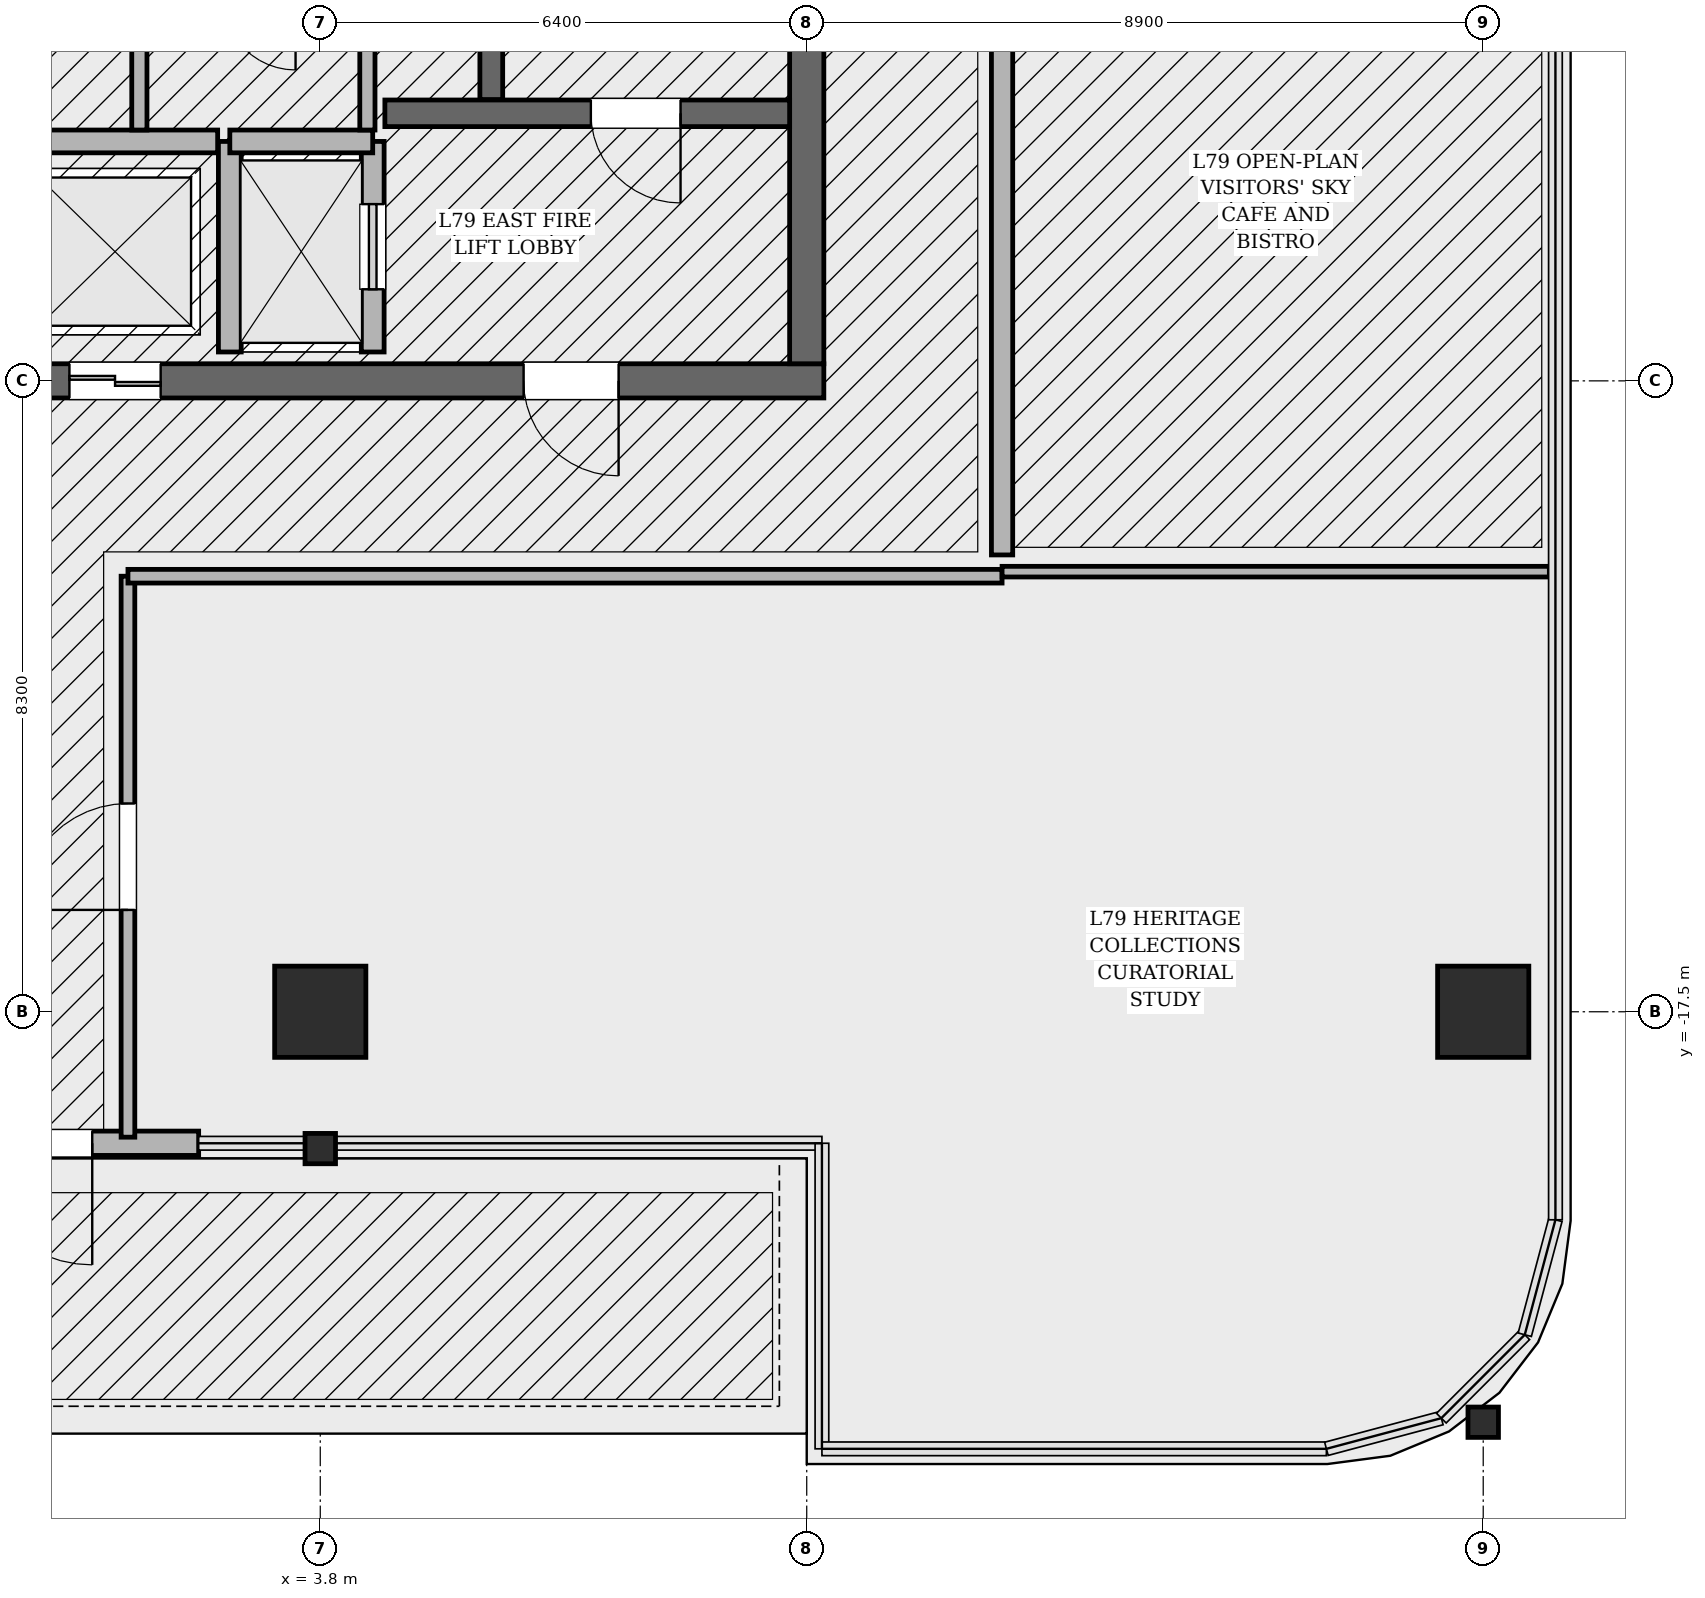
"""IFC4 building model, lengths in metres.
Left out: names, types, materials, properties, quantities, classifications, styles, units other than length and angle.
Written with IfcOpenShell. Run it as: python <this file> out.ifc"""

import sys

from ifc_helpers import new_model, si_unit, direction, frame, frame_2d, origin, origin_2d, place, context, subcontext, project, spatial, rectangle, hollow_rectangle, i_section, extrude, element, fill, save


model = new_model("IFC4")
c1 = context("Model", 3, precision=1e-05, world=origin(), true_north=direction((0.0, 1.0)))
c2 = subcontext(c1, "Body", "Model", "MODEL_VIEW")
j1 = project(units=[si_unit("LENGTHUNIT", "METRE"), si_unit("PLANEANGLEUNIT", "RADIAN")], contexts=[c1])
p1 = place(None, origin())
s1 = spatial("IfcSite", under=j1, at=p1, CompositionType="ELEMENT")
p2 = place(p1, origin())
s2 = spatial("IfcBuilding", under=s1, at=p2, CompositionType="ELEMENT")
p3 = place(p2, frame((0.0, 0.0, 334.2)))
s3 = spatial("IfcBuildingStorey", under=s2, at=p3, CompositionType="ELEMENT", Elevation=334.2)
p4 = place(p3, frame((10.425, -9.2, 0.0), z_axis=(0.0, 0.0, 1.0), x_axis=(-1.0, 0.0, 0.0)))
e1 = element("IfcWall", 1, at=p4, inside=s3, PredefinedType="SHEAR", context=c2, shape_type="SweptSolid", body=[
    extrude(rectangle(XDim=20.85, YDim=0.45, at=frame_2d((10.425, 0.0))), origin(), (0.0, 0.0, 1.0), 4.8),
])
p5 = place(p4, frame((2.7, 0.0, 0.0)))
e2 = element("IfcOpeningElement", 2, at=p5, cuts=e1, PredefinedType="OPENING", context=c2, shape_type="SweptSolid", body=[
    extrude(rectangle(XDim=1.25, YDim=2.25, at=frame_2d((0.625, 1.125))), frame((0.0, 0.235, 0.0), z_axis=(0.0, -1.0, 0.0), x_axis=(1.0, 0.0, 0.0)), (0.0, 0.0, 1.0), 0.47),
])
p6 = place(p4, frame((16.9, 0.0, 0.0)))
e3 = element("IfcOpeningElement", 3, at=p6, cuts=e1, PredefinedType="OPENING", context=c2, shape_type="SweptSolid", body=[
    extrude(rectangle(XDim=1.25, YDim=2.25, at=frame_2d((0.625, 1.125))), frame((0.0, 0.235, 0.0), z_axis=(0.0, -1.0, 0.0), x_axis=(1.0, 0.0, 0.0)), (0.0, 0.0, 1.0), 0.47),
])
p7 = place(p4, frame((10.925, 0.0, 0.0)))
e4 = element("IfcOpeningElement", 4, at=p7, cuts=e1, PredefinedType="OPENING", context=c2, shape_type="SweptSolid", body=[
    extrude(rectangle(XDim=1.2, YDim=2.3, at=frame_2d((0.6, 1.15))), frame((0.0, 0.235, 0.0), z_axis=(0.0, -1.0, 0.0), x_axis=(1.0, 0.0, 0.0)), (0.0, 0.0, 1.0), 0.47),
])
p8 = place(p4, frame((8.725, 0.0, 0.0)))
e5 = element("IfcOpeningElement", 5, at=p8, cuts=e1, PredefinedType="OPENING", context=c2, shape_type="SweptSolid", body=[
    extrude(rectangle(XDim=1.2, YDim=2.3, at=frame_2d((0.6, 1.15))), frame((0.0, 0.235, 0.0), z_axis=(0.0, -1.0, 0.0), x_axis=(1.0, 0.0, 0.0)), (0.0, 0.0, 1.0), 0.47),
])
p9 = place(p3, frame((10.2, 8.975, 0.0), z_axis=(0.0, 0.0, 1.0), x_axis=(0.0, -1.0, 0.0)))
e6 = element("IfcWall", 6, at=p9, inside=s3, PredefinedType="SHEAR", context=c2, shape_type="SweptSolid", body=[
    extrude(rectangle(XDim=17.95, YDim=0.45, at=frame_2d((8.975, 0.0))), origin(), (0.0, 0.0, 1.0), 4.8),
])
p10 = place(p9, frame((4.005, 0.0, 0.0)))
e7 = element("IfcOpeningElement", 7, at=p10, cuts=e6, PredefinedType="OPENING", context=c2, shape_type="SweptSolid", body=[
    extrude(rectangle(XDim=1.18, YDim=2.2, at=frame_2d((0.59, 1.1))), frame((0.0, 0.235, 0.0), z_axis=(0.0, -1.0, 0.0), x_axis=(1.0, 0.0, 0.0)), (0.0, 0.0, 1.0), 0.47),
])
p11 = place(p3, frame((6.05, 3.45, 0.0), z_axis=(0.0, 0.0, 1.0), x_axis=(0.0, -1.0, 0.0)))
e8 = element("IfcWall", 8, at=p11, inside=s3, PredefinedType="SOLIDWALL", context=c2, shape_type="SweptSolid", body=[
    extrude(rectangle(XDim=8.95, YDim=0.3, at=frame_2d((4.475, 0.0))), origin(), (0.0, 0.0, 1.0), 4.8),
])
p12 = place(p3, frame((4.65, -5.68, 0.0), z_axis=(0.0, 0.0, 1.0), x_axis=(1.0, 0.0, 0.0)))
e9 = element("IfcWall", 9, at=p12, inside=s3, PredefinedType="SOLIDWALL", context=c2, shape_type="SweptSolid", body=[
    extrude(rectangle(XDim=5.325, YDim=0.35, at=frame_2d((2.663, 0.0))), origin(), (0.0, 0.0, 1.0), 4.8),
])
p13 = place(p12, frame((2.71, 0.0, 0.0)))
e10 = element("IfcOpeningElement", 10, at=p13, cuts=e9, PredefinedType="OPENING", context=c2, shape_type="SweptSolid", body=[
    extrude(rectangle(XDim=1.18, YDim=2.2, at=frame_2d((0.59, 1.1))), frame((0.0, 0.185, 0.0), z_axis=(0.0, -1.0, 0.0), x_axis=(1.0, 0.0, 0.0)), (0.0, 0.0, 1.0), 0.37),
])
for number, where, z_axis, x_axis in (
    (11, (3.8, -17.5, 0.0), (0.0, 0.0, 1.0), (1.0, 0.0, 0.0)),
    (12, (19.1, -17.5, 0.0), (0.0, 0.0, 1.0), (1.0, 0.0, 0.0)),
):
    element("IfcColumn", number, at=place(p3, frame(where, z_axis=z_axis, x_axis=x_axis)), inside=s3, PredefinedType="COLUMN", context=c2, shape_type="SweptSolid", body=[
        extrude(hollow_rectangle(XDim=1.2, YDim=1.2, WallThickness=0.035, at=origin_2d()), origin(), (0.0, 0.0, 1.0), 4.8),
    ])
for number, where, z_axis, x_axis in (
    (13, (3.8, -19.3, 0.0), (0.0, 0.0, 1.0), (1.0, 0.0, 0.0)),
    (14, (19.1, -22.9, 0.0), (0.0, 0.0, 1.0), (1.0, 0.0, 0.0)),
):
    element("IfcColumn", number, at=place(p3, frame(where, z_axis=z_axis, x_axis=x_axis)), inside=s3, PredefinedType="COLUMN", context=c2, shape_type="SweptSolid", body=[
        extrude(i_section(OverallWidth=0.401, OverallDepth=0.399, WebThickness=0.025, FlangeThickness=0.04, FilletRadius=0.018, at=origin_2d()), origin(), (0.0, 0.0, 1.0), 4.798),
    ])
p14 = place(p3, frame((-2.2, -19.23, 0.0), z_axis=(0.0, 0.0, 1.0), x_axis=(1.0, 0.0, 0.0)))
e15 = element("IfcWall", 15, at=p14, inside=s3, PredefinedType="SOLIDWALL", context=c2, shape_type="SweptSolid", body=[
    extrude(rectangle(XDim=4.4, YDim=0.32, at=frame_2d((2.2, 0.0))), origin(), (0.0, 0.0, 1.0), 4.54),
])
p15 = place(p14, frame((1.4, 0.0, 0.0)))
e16 = element("IfcOpeningElement", 16, at=p15, cuts=e15, PredefinedType="OPENING", context=c2, shape_type="SweptSolid", body=[
    extrude(rectangle(XDim=1.6, YDim=2.35, at=frame_2d((0.8, 1.175))), frame((0.0, 0.17, 0.0), z_axis=(0.0, -1.0, 0.0), x_axis=(1.0, 0.0, 0.0)), (0.0, 0.0, 1.0), 0.34),
])
p16 = place(p3, frame((4.49, -8.82, 0.0), z_axis=(0.0, 0.0, 1.0), x_axis=(0.0, 1.0, 0.0)))
e17 = element("IfcWall", 17, at=p16, inside=s3, PredefinedType="SOLIDWALL", context=c2, shape_type="SweptSolid", body=[
    extrude(rectangle(XDim=2.77, YDim=0.3, at=frame_2d((1.385, 0.0))), origin(), (0.0, 0.0, 1.0), 4.54),
])
p17 = place(p16, frame((0.825, 0.0, 0.0)))
e18 = element("IfcOpeningElement", 18, at=p17, cuts=e17, PredefinedType="OPENING", context=c2, shape_type="SweptSolid", body=[
    extrude(rectangle(XDim=1.12, YDim=2.25, at=frame_2d((0.56, 1.125))), frame((0.0, 0.16, 0.0), z_axis=(0.0, -1.0, 0.0), x_axis=(1.0, 0.0, 0.0)), (0.0, 0.0, 1.0), 0.32),
])
p18 = place(p3, frame((2.61, -8.82, 0.0), z_axis=(0.0, 0.0, 1.0), x_axis=(0.0, 1.0, 0.0)))
e19 = element("IfcWall", 19, at=p18, inside=s3, PredefinedType="SOLIDWALL", context=c2, shape_type="SweptSolid", body=[
    extrude(rectangle(XDim=2.77, YDim=0.3, at=frame_2d((1.385, 0.0))), origin(), (0.0, 0.0, 1.0), 4.54),
])
p19 = place(p3, frame((2.61, -6.05, 0.0), z_axis=(0.0, 0.0, 1.0), x_axis=(1.0, 0.0, 0.0)))
e20 = element("IfcWall", 20, at=p19, inside=s3, PredefinedType="SOLIDWALL", context=c2, shape_type="SweptSolid", body=[
    extrude(rectangle(XDim=1.88, YDim=0.3, at=frame_2d((0.94, 0.0))), origin(), (0.0, 0.0, 1.0), 4.54),
])
p20 = place(p3, frame((-2.45, -6.05, 0.0), z_axis=(0.0, 0.0, 1.0), x_axis=(1.0, 0.0, 0.0)))
e21 = element("IfcWall", 21, at=p20, inside=s3, PredefinedType="SOLIDWALL", context=c2, shape_type="SweptSolid", body=[
    extrude(rectangle(XDim=4.9, YDim=0.3, at=frame_2d((2.45, 0.0))), origin(), (0.0, 0.0, 1.0), 4.54),
])
for number, where, z_axis, x_axis in (
    (22, (1.42, -5.9, 0.0), (0.0, 0.0, 1.0), (0.0, 1.0, 0.0)),
    (23, (4.42, -5.9, 0.0), (0.0, 0.0, 1.0), (0.0, 1.0, 0.0)),
):
    element("IfcWall", number, at=place(p3, frame(where, z_axis=z_axis, x_axis=x_axis)), inside=s3, PredefinedType="SOLIDWALL", context=c2, shape_type="SweptSolid", body=[
        extrude(rectangle(XDim=1.74, YDim=0.2, at=frame_2d((0.87, 0.0))), origin(), (0.0, 0.0, 1.0), 4.54),
    ])
p21 = place(p3, frame((1.27, -19.15, 0.0), z_axis=(0.0, 0.0, 1.0), x_axis=(0.0, 1.0, 0.0)))
e24 = element("IfcWall", 24, at=p21, inside=s3, PredefinedType="PARTITIONING", context=c2, shape_type="SweptSolid", body=[
    extrude(rectangle(XDim=7.38, YDim=0.18, at=frame_2d((3.69, 0.0))), origin(), (0.0, 0.0, 1.0), 3.214),
])
p22 = place(p21, frame((2.99, 0.0, 0.0)))
e25 = element("IfcOpeningElement", 25, at=p22, cuts=e24, PredefinedType="OPENING", context=c2, shape_type="SweptSolid", body=[
    extrude(rectangle(XDim=1.4, YDim=2.25, at=frame_2d((0.7, 1.125))), frame((0.0, 0.1, 0.0), z_axis=(0.0, -1.0, 0.0), x_axis=(1.0, 0.0, 0.0)), (0.0, 0.0, 1.0), 0.2),
])
p23 = place(p3, frame((1.27, -11.77, 0.0), z_axis=(0.0, 0.0, 1.0), x_axis=(1.0, 0.0, 0.0)))
e26 = element("IfcWall", 26, at=p23, inside=s3, PredefinedType="PARTITIONING", context=c2, shape_type="SweptSolid", body=[
    extrude(rectangle(XDim=11.5, YDim=0.18, at=frame_2d((5.75, 0.0))), origin(), (0.0, 0.0, 1.0), 3.214),
])
p24 = place(p3, frame((12.77, -11.71, 0.0), z_axis=(0.0, 0.0, 1.0), x_axis=(1.0, 0.0, 0.0)))
e27 = element("IfcWall", 27, at=p24, inside=s3, PredefinedType="PARTITIONING", context=c2, shape_type="SweptSolid", body=[
    extrude(rectangle(XDim=7.2, YDim=0.14, at=frame_2d((3.6, 0.0))), origin(), (0.0, 0.0, 1.0), 3.214),
])
p25 = place(p3, frame((12.77, -11.49, 0.0), z_axis=(0.0, 0.0, 1.0), x_axis=(0.0, 1.0, 0.0)))
e28 = element("IfcWall", 28, at=p25, inside=s3, PredefinedType="SOLIDWALL", context=c2, shape_type="SweptSolid", body=[
    extrude(rectangle(XDim=10.14, YDim=0.28, at=frame_2d((5.07, 0.0))), origin(), (0.0, 0.0, 1.0), 3.214),
])
p26 = place(p15, origin())
e29 = element("IfcDoor", 29, at=p26, inside=s3, OperationType="SINGLE_SWING_RIGHT", PredefinedType="DOOR", context=c2, shape_type="SweptSolid", body=[
    extrude(rectangle(XDim=1.6, YDim=2.35, at=frame_2d((0.8, 1.175))), frame((0.0, 0.025, 0.0), z_axis=(0.0, -1.0, 0.0), x_axis=(1.0, 0.0, 0.0)), (0.0, 0.0, 1.0), 0.05),
])
fill(e16, e29)
p27 = place(p13, origin())
e30 = element("IfcDoor", 30, at=p27, inside=s3, OperationType="SINGLE_SWING_RIGHT", PredefinedType="DOOR", context=c2, shape_type="SweptSolid", body=[
    extrude(rectangle(XDim=1.18, YDim=2.2, at=frame_2d((0.59, 1.1))), frame((0.0, 0.025, 0.0), z_axis=(0.0, -1.0, 0.0), x_axis=(1.0, 0.0, 0.0)), (0.0, 0.0, 1.0), 0.05),
])
fill(e10, e30)
p28 = place(p5, origin())
e31 = element("IfcDoor", 31, at=p28, inside=s3, OperationType="SINGLE_SWING_LEFT", PredefinedType="DOOR", context=c2, shape_type="SweptSolid", body=[
    extrude(rectangle(XDim=1.25, YDim=2.25, at=frame_2d((0.625, 1.125))), frame((0.0, 0.025, 0.0), z_axis=(0.0, -1.0, 0.0), x_axis=(1.0, 0.0, 0.0)), (0.0, 0.0, 1.0), 0.05),
])
fill(e2, e31)
p29 = place(p17, origin())
e32 = element("IfcDoor", 32, at=p29, inside=s3, OperationType="SLIDING_TO_RIGHT", PredefinedType="DOOR", context=c2, shape_type="SweptSolid", body=[
    extrude(rectangle(XDim=1.12, YDim=2.25, at=frame_2d((0.56, 1.125))), frame((0.0, 0.025, 0.0), z_axis=(0.0, -1.0, 0.0), x_axis=(1.0, 0.0, 0.0)), (0.0, 0.0, 1.0), 0.05),
])
fill(e18, e32)
p30 = place(p8, origin())
e33 = element("IfcDoor", 33, at=p30, inside=s3, OperationType="DOUBLE_DOOR_SLIDING", PredefinedType="DOOR", context=c2, shape_type="SweptSolid", body=[
    extrude(rectangle(XDim=1.2, YDim=2.3, at=frame_2d((0.6, 1.15))), frame((0.0, 0.025, 0.0), z_axis=(0.0, -1.0, 0.0), x_axis=(1.0, 0.0, 0.0)), (0.0, 0.0, 1.0), 0.05),
])
fill(e5, e33)
p31 = place(p22, origin())
e34 = element("IfcDoor", 34, at=p31, inside=s3, OperationType="SINGLE_SWING_LEFT", PredefinedType="DOOR", context=c2, shape_type="SweptSolid", body=[
    extrude(rectangle(XDim=1.4, YDim=2.25, at=frame_2d((0.7, 1.125))), frame((0.0, 0.025, 0.0), z_axis=(0.0, -1.0, 0.0), x_axis=(1.0, 0.0, 0.0)), (0.0, 0.0, 1.0), 0.05),
])
fill(e25, e34)
save(model, sys.argv[1])
